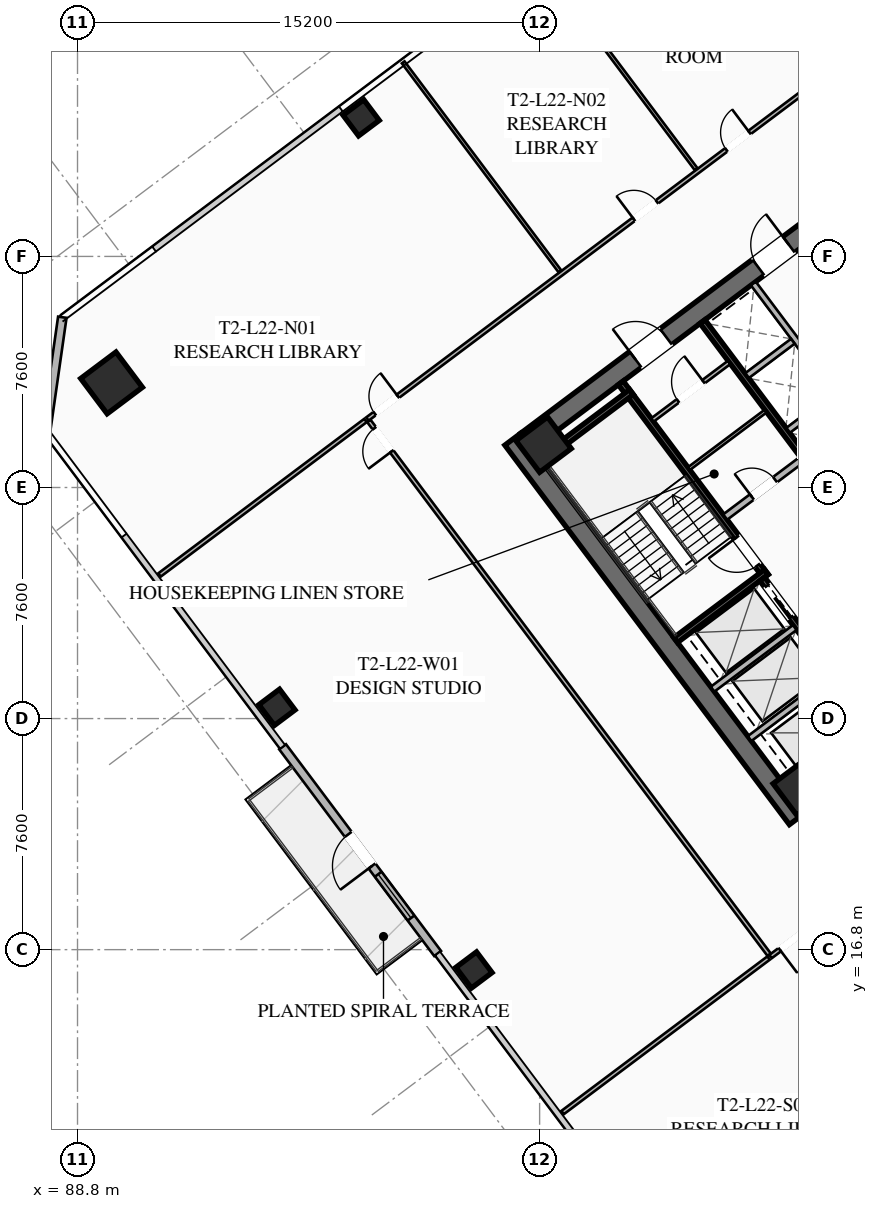
"""IFC4 building model, lengths in metres.
Left out: names, types, materials, properties, quantities, classifications, styles, units other than length and angle.
Written with IfcOpenShell. Run it as: python <this file> out.ifc"""

import sys

from ifc_helpers import new_model, si_unit, direction, frame, frame_2d, origin, origin_2d, place, context, subcontext, project, spatial, rectangle, hollow_rectangle, extrude, element, fill, save


model = new_model("IFC4")
c1 = context("Model", 3, precision=1e-05, world=origin(), true_north=direction((0.0, 1.0)))
c2 = subcontext(c1, "Body", "Model", "MODEL_VIEW")
j1 = project(units=[si_unit("LENGTHUNIT", "METRE"), si_unit("PLANEANGLEUNIT", "RADIAN")], contexts=[c1])
p1 = place(None, origin())
s1 = spatial("IfcSite", under=j1, at=p1, CompositionType="ELEMENT")
p2 = place(p1, origin())
s2 = spatial("IfcBuilding", under=s1, at=p2, CompositionType="ELEMENT")
p3 = place(p2, frame((0.0, 0.0, 84.95)))
s3 = spatial("IfcBuildingStorey", under=s2, at=p3, CompositionType="ELEMENT", Elevation=84.95)
p4 = place(p3, frame((112.476, 21.107, 0.0), z_axis=(0.0, 0.0, 1.0), x_axis=(-0.600005007985, 0.799996243986, 0.0)))
e1 = element("IfcWall", 1, at=p4, inside=s3, PredefinedType="SHEAR", context=c2, shape_type="SweptSolid", body=[
    extrude(rectangle(XDim=15.6, YDim=0.65, at=frame_2d((7.8, 0.0))), origin(), (0.0, 0.0, 1.0), 3.55),
])
p5 = place(p3, frame((124.429, 30.478, 0.0), z_axis=(0.0, 0.0, 1.0), x_axis=(-0.799998028465, -0.600002628705, 0.0)))
e2 = element("IfcWall", 2, at=p5, inside=s3, PredefinedType="SHEAR", context=c2, shape_type="SweptSolid", body=[
    extrude(rectangle(XDim=14.86, YDim=0.65, at=frame_2d((7.43, 0.0))), origin(), (0.0, 0.0, 1.0), 3.55),
])
p6 = place(p5, frame((9.13, 0.0, 0.0)))
e3 = element("IfcOpeningElement", 3, at=p6, cuts=e2, PredefinedType="OPENING", context=c2, shape_type="SweptSolid", body=[
    extrude(rectangle(XDim=1.25, YDim=2.25, at=frame_2d((0.625, 1.125))), frame((0.0, 0.335, 0.0), z_axis=(0.0, -1.0, 0.0), x_axis=(1.0, 0.0, 0.0)), (0.0, 0.0, 1.0), 0.67),
])
p7 = place(p5, frame((4.08, 0.0, 0.0)))
e4 = element("IfcOpeningElement", 4, at=p7, cuts=e2, PredefinedType="OPENING", context=c2, shape_type="SweptSolid", body=[
    extrude(rectangle(XDim=1.25, YDim=2.25, at=frame_2d((0.625, 1.125))), frame((0.0, 0.335, 0.0), z_axis=(0.0, -1.0, 0.0), x_axis=(1.0, 0.0, 0.0)), (0.0, 0.0, 1.0), 0.67),
])
p8 = place(p3, frame((103.571, 33.522, 0.0), z_axis=(0.0, 0.0, 1.0), x_axis=(0.799998028465, 0.600002628705, 0.0)))
e5 = element("IfcWall", 5, at=p8, inside=s3, PredefinedType="SHEAR", context=c2, shape_type="SweptSolid", body=[
    extrude(rectangle(XDim=14.86, YDim=0.65, at=frame_2d((7.43, 0.0))), origin(), (0.0, 0.0, 1.0), 3.55),
])
p9 = place(p8, frame((4.48, 0.0, 0.0)))
e6 = element("IfcOpeningElement", 6, at=p9, cuts=e5, PredefinedType="OPENING", context=c2, shape_type="SweptSolid", body=[
    extrude(rectangle(XDim=1.25, YDim=2.25, at=frame_2d((0.625, 1.125))), frame((0.0, 0.335, 0.0), z_axis=(0.0, -1.0, 0.0), x_axis=(1.0, 0.0, 0.0)), (0.0, 0.0, 1.0), 0.67),
])
p10 = place(p8, frame((9.53, 0.0, 0.0)))
e7 = element("IfcOpeningElement", 7, at=p10, cuts=e5, PredefinedType="OPENING", context=c2, shape_type="SweptSolid", body=[
    extrude(rectangle(XDim=1.25, YDim=2.25, at=frame_2d((0.625, 1.125))), frame((0.0, 0.335, 0.0), z_axis=(0.0, -1.0, 0.0), x_axis=(1.0, 0.0, 0.0)), (0.0, 0.0, 1.0), 0.67),
])
for number, where, z_axis, x_axis in (
    (8, (112.59, 22.13, 0.0), (0.0, 0.0, 1.0), (0.8, 0.6, 0.0)),
    (9, (104.13, 33.41, 0.0), (0.0, 0.0, 1.0), (0.8, 0.6, 0.0)),
):
    element("IfcColumn", number, at=place(p3, frame(where, z_axis=z_axis, x_axis=x_axis)), inside=s3, PredefinedType="COLUMN", context=c2, shape_type="SweptSolid", body=[
        extrude(hollow_rectangle(XDim=1.3, YDim=1.3, WallThickness=0.05, at=origin_2d()), origin(), (0.0, 0.0, 1.0), 3.35),
    ])
p11 = place(p3, frame((89.92, 35.44, 0.0), z_axis=(0.0, 0.0, 1.0), x_axis=(0.799999996291, 0.600000004945, 0.0)))
e10 = element("IfcColumn", 10, at=p11, inside=s3, PredefinedType="COLUMN", context=c2, shape_type="SweptSolid", body=[
    extrude(hollow_rectangle(XDim=1.45, YDim=1.45, WallThickness=0.055, at=origin_2d()), origin(), (0.0, 0.0, 1.0), 3.35),
])
for number, where, z_axis, x_axis in (
    (11, (98.13, 44.16, 0.0), (0.0, 0.0, 1.0), (0.8, 0.6, 0.0)),
    (12, (95.36, 24.77, 0.0), (0.0, 0.0, 1.0), (0.8, 0.6, 0.0)),
    (13, (101.84, 16.13, 0.0), (0.0, 0.0, 1.0), (0.8, 0.6, 0.0)),
):
    element("IfcColumn", number, at=place(p3, frame(where, z_axis=z_axis, x_axis=x_axis)), inside=s3, PredefinedType="COLUMN", context=c2, shape_type="SweptSolid", body=[
        extrude(hollow_rectangle(XDim=0.85, YDim=0.85, WallThickness=0.035, at=origin_2d()), origin(), (0.0, 0.0, 1.0), 3.35),
    ])
p12 = place(p3, frame((100.646, 16.672, 0.0), z_axis=(0.0, 0.0, 1.0), x_axis=(-0.600018382406, 0.799986212866, 0.0)))
e14 = element("IfcWall", 14, at=p12, inside=s3, PredefinedType="SOLIDWALL", context=c2, shape_type="SweptSolid", body=[
    extrude(rectangle(XDim=8.5, YDim=0.28, at=frame_2d((4.25, 0.0))), origin(), (0.0, 0.0, 1.0), 3.35),
])
p13 = place(p12, frame((3.6, 0.0, 0.0)))
e15 = element("IfcOpeningElement", 15, at=p13, cuts=e14, PredefinedType="OPENING", context=c2, shape_type="SweptSolid", body=[
    extrude(rectangle(XDim=1.3, YDim=2.15, at=frame_2d((0.65, 1.075))), frame((0.0, 0.15, 0.0), z_axis=(0.0, -1.0, 0.0), x_axis=(1.0, 0.0, 0.0)), (0.0, 0.0, 1.0), 0.3),
])
p14 = place(p12, frame((1.46, 0.0, 0.85)))
e16 = element("IfcOpeningElement", 16, at=p14, cuts=e14, PredefinedType="OPENING", context=c2, shape_type="SweptSolid", body=[
    extrude(rectangle(XDim=1.8, YDim=1.92, at=frame_2d((0.9, 0.96))), frame((0.0, 0.15, 0.0), z_axis=(0.0, -1.0, 0.0), x_axis=(1.0, 0.0, 0.0)), (0.0, 0.0, 1.0), 0.3),
])
p15 = place(p3, frame((87.76, 33.82, 0.0), z_axis=(0.0, 0.0, 1.0), x_axis=(0.141430307517, 0.989948214866, 0.0)))
e17 = element("IfcWall", 17, at=p15, inside=s3, PredefinedType="SOLIDWALL", context=c2, shape_type="SweptSolid", body=[
    extrude(rectangle(XDim=3.818, YDim=0.28, at=frame_2d((1.909, 0.0))), origin(), (0.0, 0.0, 1.0), 3.35),
])
p16 = place(p3, frame((111.44, 29.08, 0.0), z_axis=(0.0, 0.0, 1.0), x_axis=(-0.600009827119, 0.799992629566, 0.0)))
e18 = element("IfcWall", 18, at=p16, inside=s3, PredefinedType="SHEAR", context=c2, shape_type="SweptSolid", body=[
    extrude(rectangle(XDim=7.95, YDim=0.2, at=frame_2d((3.975, 0.0))), origin(), (0.0, 0.0, 1.0), 3.35),
])
p17 = place(p16, frame((0.45, 0.0, 0.0)))
e19 = element("IfcOpeningElement", 19, at=p17, cuts=e18, PredefinedType="OPENING", context=c2, shape_type="SweptSolid", body=[
    extrude(rectangle(XDim=1.15, YDim=2.2, at=frame_2d((0.575, 1.1))), frame((0.0, 0.11, 0.0), z_axis=(0.0, -1.0, 0.0), x_axis=(1.0, 0.0, 0.0)), (0.0, 0.0, 1.0), 0.22),
])
for number, where, z_axis, x_axis in (
    (20, (108.476, 26.982, 0.0), (0.0, 0.0, 1.0), (0.8, 0.6, 0.0)),
    (21, (104.036, 32.902, 0.0), (0.0, 0.0, 1.0), (0.8, 0.6, 0.0)),
):
    element("IfcWall", number, at=place(p3, frame(where, z_axis=z_axis, x_axis=x_axis)), inside=s3, PredefinedType="SHEAR", context=c2, shape_type="SweptSolid", body=[
        extrude(rectangle(XDim=3.73, YDim=0.2, at=frame_2d((1.865, 0.0))), origin(), (0.0, 0.0, 1.0), 3.35),
    ])
p18 = place(p3, frame((117.938, 26.016, 0.0), z_axis=(0.0, 0.0, 1.0), x_axis=(-0.600005463273, 0.799995902516, 0.0)))
e22 = element("IfcWall", 22, at=p18, inside=s3, PredefinedType="SHEAR", context=c2, shape_type="SweptSolid", body=[
    extrude(rectangle(XDim=14.3, YDim=0.2, at=frame_2d((7.15, 0.0))), origin(), (0.0, 0.0, 1.0), 3.35),
])
p19 = place(p3, frame((110.104, 31.028, 0.0), z_axis=(0.0, 0.0, 1.0), x_axis=(0.800018601094, 0.59997519774, 0.0)))
e23 = element("IfcWall", 23, at=p19, inside=s3, PredefinedType="SOLIDWALL", context=c2, shape_type="SweptSolid", body=[
    extrude(rectangle(XDim=3.15, YDim=0.22, at=frame_2d((1.575, 0.0))), origin(), (0.0, 0.0, 1.0), 2.703),
])
p20 = place(p19, frame((1.1, 0.0, 0.0)))
e24 = element("IfcOpeningElement", 24, at=p20, cuts=e23, PredefinedType="OPENING", context=c2, shape_type="SweptSolid", body=[
    extrude(rectangle(XDim=0.95, YDim=2.05, at=frame_2d((0.475, 1.025))), frame((0.0, 0.12, 0.0), z_axis=(0.0, -1.0, 0.0), x_axis=(1.0, 0.0, 0.0)), (0.0, 0.0, 1.0), 0.24),
])
p21 = place(p3, frame((115.13, 23.91, 0.0), z_axis=(0.0, 0.0, 1.0), x_axis=(-0.599975393228, 0.800018454488, 0.0)))
e25 = element("IfcWall", 25, at=p21, inside=s3, PredefinedType="SHEAR", context=c2, shape_type="SweptSolid", body=[
    extrude(rectangle(XDim=6.35, YDim=0.2, at=frame_2d((3.175, 0.0))), origin(), (0.0, 0.0, 1.0), 3.35),
])
p22 = place(p21, frame((4.775, 0.0, 0.0)))
e26 = element("IfcOpeningElement", 26, at=p22, cuts=e25, PredefinedType="OPENING", context=c2, shape_type="SweptSolid", body=[
    extrude(rectangle(XDim=1.3, YDim=2.25, at=frame_2d((0.65, 1.125))), frame((0.0, 0.11, 0.0), z_axis=(0.0, -1.0, 0.0), x_axis=(1.0, 0.0, 0.0)), (0.0, 0.0, 1.0), 0.22),
])
p23 = place(p21, frame((2.775, 0.0, 0.0)))
e27 = element("IfcOpeningElement", 27, at=p23, cuts=e25, PredefinedType="OPENING", context=c2, shape_type="SweptSolid", body=[
    extrude(rectangle(XDim=1.3, YDim=2.25, at=frame_2d((0.65, 1.125))), frame((0.0, 0.11, 0.0), z_axis=(0.0, -1.0, 0.0), x_axis=(1.0, 0.0, 0.0)), (0.0, 0.0, 1.0), 0.22),
])
p24 = place(p21, frame((0.575, 0.0, 0.0)))
e28 = element("IfcOpeningElement", 28, at=p24, cuts=e25, PredefinedType="OPENING", context=c2, shape_type="SweptSolid", body=[
    extrude(rectangle(XDim=1.3, YDim=2.25, at=frame_2d((0.65, 1.125))), frame((0.0, 0.11, 0.0), z_axis=(0.0, -1.0, 0.0), x_axis=(1.0, 0.0, 0.0)), (0.0, 0.0, 1.0), 0.22),
])
for number, where, z_axis, x_axis in (
    (29, (110.906, 23.742, 0.0), (0.0, 0.0, 1.0), (0.8, 0.6, 0.0)),
    (30, (109.688, 25.366, 0.0), (0.0, 0.0, 1.0), (0.8, 0.6, 0.0)),
):
    element("IfcWall", number, at=place(p3, frame(where, z_axis=z_axis, x_axis=x_axis)), inside=s3, PredefinedType="SOLIDWALL", context=c2, shape_type="SweptSolid", body=[
        extrude(rectangle(XDim=3.38, YDim=0.2, at=frame_2d((1.69, 0.0))), origin(), (0.0, 0.0, 1.0), 3.35),
    ])
p25 = place(p3, frame((107.71, 34.22, 0.0), z_axis=(0.0, 0.0, 1.0), x_axis=(0.799981399002, 0.60002480053, 0.0)))
e31 = element("IfcWall", 31, at=p25, inside=s3, PredefinedType="PARTITIONING", context=c2, shape_type="SweptSolid", body=[
    extrude(rectangle(XDim=3.15, YDim=0.135, at=frame_2d((1.575, 0.0))), origin(), (0.0, 0.0, 1.0), 2.703),
])
p26 = place(p25, frame((1.05, 0.0, 0.0)))
e32 = element("IfcOpeningElement", 32, at=p26, cuts=e31, PredefinedType="OPENING", context=c2, shape_type="SweptSolid", body=[
    extrude(rectangle(XDim=1.05, YDim=2.2, at=frame_2d((0.525, 1.1))), frame((0.0, 0.077, 0.0), z_axis=(0.0, -1.0, 0.0), x_axis=(1.0, 0.0, 0.0)), (0.0, 0.0, 1.0), 0.155),
])
p27 = place(p3, frame((108.91, 32.62, 0.0), z_axis=(0.0, 0.0, 1.0), x_axis=(0.800018601094, 0.59997519774, 0.0)))
e33 = element("IfcWall", 33, at=p27, inside=s3, PredefinedType="PARTITIONING", context=c2, shape_type="SweptSolid", body=[
    extrude(rectangle(XDim=3.15, YDim=0.11, at=frame_2d((1.575, 0.0))), origin(), (0.0, 0.0, 1.0), 2.703),
])
p28 = place(p3, frame((115.11, 33.27, 0.0), z_axis=(0.0, 0.0, 1.0), x_axis=(-0.600011488909, 0.79999138319, 0.0)))
e34 = element("IfcWall", 34, at=p28, inside=s3, PredefinedType="SOLIDWALL", context=c2, shape_type="SweptSolid", body=[
    extrude(rectangle(XDim=6.8, YDim=0.2, at=frame_2d((3.4, 0.0))), origin(), (0.0, 0.0, 1.0), 3.35),
])
p29 = place(p3, frame((112.176, 33.882, 0.0), z_axis=(0.0, 0.0, 1.0), x_axis=(0.8, 0.6, 0.0)))
e35 = element("IfcWall", 35, at=p29, inside=s3, PredefinedType="SOLIDWALL", context=c2, shape_type="SweptSolid", body=[
    extrude(rectangle(XDim=1.88, YDim=0.2, at=frame_2d((0.94, 0.0))), origin(), (0.0, 0.0, 1.0), 3.35),
])
p30 = place(p3, frame((110.826, 35.682, 0.0), z_axis=(0.0, 0.0, 1.0), x_axis=(0.799984418148, 0.600020775241, 0.0)))
e36 = element("IfcWall", 36, at=p30, inside=s3, PredefinedType="SOLIDWALL", context=c2, shape_type="SweptSolid", body=[
    extrude(rectangle(XDim=1.88, YDim=0.2, at=frame_2d((0.94, 0.0))), origin(), (0.0, 0.0, 1.0), 3.35),
])
p31 = place(p3, frame((98.336, 34.252, 0.0), z_axis=(0.0, 0.0, 1.0), x_axis=(0.8, 0.6, 0.0)))
e37 = element("IfcWall", 37, at=p31, inside=s3, PredefinedType="PARTITIONING", context=c2, shape_type="SweptSolid", body=[
    extrude(rectangle(XDim=28.23, YDim=0.135, at=frame_2d((14.115, 0.0))), origin(), (0.0, 0.0, 1.0), 2.703),
])
p32 = place(p31, frame((0.3, 0.0, 0.0)))
e38 = element("IfcOpeningElement", 38, at=p32, cuts=e37, PredefinedType="OPENING", context=c2, shape_type="SweptSolid", body=[
    extrude(rectangle(XDim=0.95, YDim=2.05, at=frame_2d((0.475, 1.025))), frame((0.0, 0.077, 0.0), z_axis=(0.0, -1.0, 0.0), x_axis=(1.0, 0.0, 0.0)), (0.0, 0.0, 1.0), 0.155),
])
p33 = place(p31, frame((10.953, 0.0, 0.0)))
e39 = element("IfcOpeningElement", 39, at=p33, cuts=e37, PredefinedType="OPENING", context=c2, shape_type="SweptSolid", body=[
    extrude(rectangle(XDim=0.95, YDim=2.05, at=frame_2d((0.475, 1.025))), frame((0.0, 0.077, 0.0), z_axis=(0.0, -1.0, 0.0), x_axis=(1.0, 0.0, 0.0)), (0.0, 0.0, 1.0), 0.155),
])
p34 = place(p31, frame((14.758, 0.0, 0.0)))
e40 = element("IfcOpeningElement", 40, at=p34, cuts=e37, PredefinedType="OPENING", context=c2, shape_type="SweptSolid", body=[
    extrude(rectangle(XDim=0.95, YDim=2.05, at=frame_2d((0.475, 1.025))), frame((0.0, 0.077, 0.0), z_axis=(0.0, -1.0, 0.0), x_axis=(1.0, 0.0, 0.0)), (0.0, 0.0, 1.0), 0.155),
])
p35 = place(p31, frame((26.98, 0.0, 0.0)))
e41 = element("IfcOpeningElement", 41, at=p35, cuts=e37, PredefinedType="OPENING", context=c2, shape_type="SweptSolid", body=[
    extrude(rectangle(XDim=0.95, YDim=2.05, at=frame_2d((0.475, 1.025))), frame((0.0, 0.077, 0.0), z_axis=(0.0, -1.0, 0.0), x_axis=(1.0, 0.0, 0.0)), (0.0, 0.0, 1.0), 0.155),
])
for number, where, z_axis, x_axis in (
    (42, (104.672, 39.104, 0.0), (0.0, 0.0, 1.0), (-0.6, 0.8, 0.0)),
    (43, (109.152, 42.464, 0.0), (0.0, 0.0, 1.0), (-0.6, 0.8, 0.0)),
):
    element("IfcWall", number, at=place(p3, frame(where, z_axis=z_axis, x_axis=x_axis)), inside=s3, PredefinedType="PARTITIONING", context=c2, shape_type="SweptSolid", body=[
        extrude(rectangle(XDim=8.6, YDim=0.11, at=frame_2d((4.3, 0.0))), origin(), (0.0, 0.0, 1.0), 2.703),
    ])
p36 = place(p3, frame((113.712, 45.884, 0.0), z_axis=(0.0, 0.0, 1.0), x_axis=(-0.6, 0.8, 0.0)))
e44 = element("IfcWall", 44, at=p36, inside=s3, PredefinedType="PARTITIONING", context=c2, shape_type="SweptSolid", body=[
    extrude(rectangle(XDim=8.6, YDim=0.11, at=frame_2d((4.3, 0.0))), origin(), (0.0, 0.0, 1.0), 2.703),
])
p37 = place(p3, frame((134.18, 33.51, 0.0), z_axis=(0.0, 0.0, 1.0), x_axis=(-0.8, -0.6, 0.0)))
e45 = element("IfcWall", 45, at=p37, inside=s3, PredefinedType="PARTITIONING", context=c2, shape_type="SweptSolid", body=[
    extrude(rectangle(XDim=28.23, YDim=0.135, at=frame_2d((14.115, 0.0))), origin(), (0.0, 0.0, 1.0), 2.703),
])
p38 = place(p37, frame((26.9, 0.0, 0.0)))
e46 = element("IfcOpeningElement", 46, at=p38, cuts=e45, PredefinedType="OPENING", context=c2, shape_type="SweptSolid", body=[
    extrude(rectangle(XDim=0.95, YDim=2.05, at=frame_2d((0.475, 1.025))), frame((0.0, 0.077, 0.0), z_axis=(0.0, -1.0, 0.0), x_axis=(1.0, 0.0, 0.0)), (0.0, 0.0, 1.0), 0.155),
])
p39 = place(p37, frame((16.368, 0.0, 0.0)))
e47 = element("IfcOpeningElement", 47, at=p39, cuts=e45, PredefinedType="OPENING", context=c2, shape_type="SweptSolid", body=[
    extrude(rectangle(XDim=0.95, YDim=2.05, at=frame_2d((0.475, 1.025))), frame((0.0, 0.077, 0.0), z_axis=(0.0, -1.0, 0.0), x_axis=(1.0, 0.0, 0.0)), (0.0, 0.0, 1.0), 0.155),
])
p40 = place(p37, frame((0.38, 0.0, 0.0)))
e48 = element("IfcOpeningElement", 48, at=p40, cuts=e45, PredefinedType="OPENING", context=c2, shape_type="SweptSolid", body=[
    extrude(rectangle(XDim=0.95, YDim=2.05, at=frame_2d((0.475, 1.025))), frame((0.0, 0.077, 0.0), z_axis=(0.0, -1.0, 0.0), x_axis=(1.0, 0.0, 0.0)), (0.0, 0.0, 1.0), 0.155),
])
p41 = place(p3, frame((111.548, 16.636, 0.0), z_axis=(0.0, 0.0, 1.0), x_axis=(-0.600001780419, 0.799998664682, 0.0)))
e49 = element("IfcWall", 49, at=p41, inside=s3, PredefinedType="PARTITIONING", context=c2, shape_type="SweptSolid", body=[
    extrude(rectangle(XDim=21.94, YDim=0.135, at=frame_2d((10.97, 0.0))), origin(), (0.0, 0.0, 1.0), 2.703),
])
p42 = place(p41, frame((20.69, 0.0, 0.0)))
e50 = element("IfcOpeningElement", 50, at=p42, cuts=e49, PredefinedType="OPENING", context=c2, shape_type="SweptSolid", body=[
    extrude(rectangle(XDim=0.95, YDim=2.05, at=frame_2d((0.475, 1.025))), frame((0.0, 0.077, 0.0), z_axis=(0.0, -1.0, 0.0), x_axis=(1.0, 0.0, 0.0)), (0.0, 0.0, 1.0), 0.155),
])
for number, where, z_axis, x_axis in (
    (51, (98.272, 34.204, 0.0), (0.0, 0.0, 1.0), (-0.8, -0.6, 0.0)),
    (52, (104.756, 11.442, 0.0), (0.0, 0.0, 1.0), (0.8, 0.6, 0.0)),
):
    element("IfcWall", number, at=place(p3, frame(where, z_axis=z_axis, x_axis=x_axis)), inside=s3, PredefinedType="PARTITIONING", context=c2, shape_type="SweptSolid", body=[
        extrude(rectangle(XDim=8.47, YDim=0.135, at=frame_2d((4.235, 0.0))), origin(), (0.0, 0.0, 1.0), 2.703),
    ])
p43 = place(p13, origin())
e53 = element("IfcDoor", 53, at=p43, inside=s3, OperationType="SINGLE_SWING_LEFT", PredefinedType="DOOR", context=c2, shape_type="SweptSolid", body=[
    extrude(rectangle(XDim=1.3, YDim=2.15, at=frame_2d((0.65, 1.075))), frame((0.0, 0.025, 0.0), z_axis=(0.0, -1.0, 0.0), x_axis=(1.0, 0.0, 0.0)), (0.0, 0.0, 1.0), 0.05),
])
fill(e15, e53)
p44 = place(p14, origin())
e54 = element("IfcWindow", 54, at=p44, inside=s3, PartitioningType="SINGLE_PANEL", PredefinedType="WINDOW", context=c2, shape_type="SweptSolid", body=[
    extrude(rectangle(XDim=1.8, YDim=1.92, at=frame_2d((0.9, 0.96))), frame((0.0, 0.03, 0.0), z_axis=(0.0, -1.0, 0.0), x_axis=(1.0, 0.0, 0.0)), (0.0, 0.0, 1.0), 0.06),
])
fill(e16, e54)
p45 = place(p9, origin())
e55 = element("IfcDoor", 55, at=p45, inside=s3, OperationType="SINGLE_SWING_LEFT", PredefinedType="DOOR", context=c2, shape_type="SweptSolid", body=[
    extrude(rectangle(XDim=1.25, YDim=2.25, at=frame_2d((0.625, 1.125))), frame((0.0, 0.025, 0.0), z_axis=(0.0, -1.0, 0.0), x_axis=(1.0, 0.0, 0.0)), (0.0, 0.0, 1.0), 0.05),
])
fill(e6, e55)
p46 = place(p10, origin())
e56 = element("IfcDoor", 56, at=p46, inside=s3, OperationType="SINGLE_SWING_RIGHT", PredefinedType="DOOR", context=c2, shape_type="SweptSolid", body=[
    extrude(rectangle(XDim=1.25, YDim=2.25, at=frame_2d((0.625, 1.125))), frame((0.0, 0.025, 0.0), z_axis=(0.0, -1.0, 0.0), x_axis=(1.0, 0.0, 0.0)), (0.0, 0.0, 1.0), 0.05),
])
fill(e7, e56)
p47 = place(p17, origin())
e57 = element("IfcDoor", 57, at=p47, inside=s3, OperationType="SINGLE_SWING_RIGHT", PredefinedType="DOOR", context=c2, shape_type="SweptSolid", body=[
    extrude(rectangle(XDim=1.15, YDim=2.2, at=frame_2d((0.575, 1.1))), frame((0.0, 0.025, 0.0), z_axis=(0.0, -1.0, 0.0), x_axis=(1.0, 0.0, 0.0)), (0.0, 0.0, 1.0), 0.05),
])
fill(e19, e57)
p48 = place(p26, origin())
e58 = element("IfcDoor", 58, at=p48, inside=s3, OperationType="SINGLE_SWING_RIGHT", PredefinedType="DOOR", context=c2, shape_type="SweptSolid", body=[
    extrude(rectangle(XDim=1.05, YDim=2.2, at=frame_2d((0.525, 1.1))), frame((0.0, 0.025, 0.0), z_axis=(0.0, -1.0, 0.0), x_axis=(1.0, 0.0, 0.0)), (0.0, 0.0, 1.0), 0.05),
])
fill(e32, e58)
p49 = place(p20, origin())
e59 = element("IfcDoor", 59, at=p49, inside=s3, OperationType="SINGLE_SWING_LEFT", PredefinedType="DOOR", context=c2, shape_type="SweptSolid", body=[
    extrude(rectangle(XDim=0.95, YDim=2.05, at=frame_2d((0.475, 1.025))), frame((0.0, 0.025, 0.0), z_axis=(0.0, -1.0, 0.0), x_axis=(1.0, 0.0, 0.0)), (0.0, 0.0, 1.0), 0.05),
])
fill(e24, e59)
p50 = place(p32, origin())
e60 = element("IfcDoor", 60, at=p50, inside=s3, OperationType="SINGLE_SWING_RIGHT", PredefinedType="DOOR", context=c2, shape_type="SweptSolid", body=[
    extrude(rectangle(XDim=0.95, YDim=2.05, at=frame_2d((0.475, 1.025))), frame((0.0, 0.025, 0.0), z_axis=(0.0, -1.0, 0.0), x_axis=(1.0, 0.0, 0.0)), (0.0, 0.0, 1.0), 0.05),
])
fill(e38, e60)
p51 = place(p33, origin())
e61 = element("IfcDoor", 61, at=p51, inside=s3, OperationType="SINGLE_SWING_LEFT", PredefinedType="DOOR", context=c2, shape_type="SweptSolid", body=[
    extrude(rectangle(XDim=0.95, YDim=2.05, at=frame_2d((0.475, 1.025))), frame((0.0, 0.025, 0.0), z_axis=(0.0, -1.0, 0.0), x_axis=(1.0, 0.0, 0.0)), (0.0, 0.0, 1.0), 0.05),
])
fill(e39, e61)
p52 = place(p34, origin())
e62 = element("IfcDoor", 62, at=p52, inside=s3, OperationType="SINGLE_SWING_RIGHT", PredefinedType="DOOR", context=c2, shape_type="SweptSolid", body=[
    extrude(rectangle(XDim=0.95, YDim=2.05, at=frame_2d((0.475, 1.025))), frame((0.0, 0.025, 0.0), z_axis=(0.0, -1.0, 0.0), x_axis=(1.0, 0.0, 0.0)), (0.0, 0.0, 1.0), 0.05),
])
fill(e40, e62)
p53 = place(p38, origin())
e63 = element("IfcDoor", 63, at=p53, inside=s3, OperationType="SINGLE_SWING_RIGHT", PredefinedType="DOOR", context=c2, shape_type="SweptSolid", body=[
    extrude(rectangle(XDim=0.95, YDim=2.05, at=frame_2d((0.475, 1.025))), frame((0.0, 0.025, 0.0), z_axis=(0.0, -1.0, 0.0), x_axis=(1.0, 0.0, 0.0)), (0.0, 0.0, 1.0), 0.05),
])
fill(e46, e63)
p54 = place(p42, origin())
e64 = element("IfcDoor", 64, at=p54, inside=s3, OperationType="SINGLE_SWING_LEFT", PredefinedType="DOOR", context=c2, shape_type="SweptSolid", body=[
    extrude(rectangle(XDim=0.95, YDim=2.05, at=frame_2d((0.475, 1.025))), frame((0.0, 0.025, 0.0), z_axis=(0.0, -1.0, 0.0), x_axis=(1.0, 0.0, 0.0)), (0.0, 0.0, 1.0), 0.05),
])
fill(e50, e64)
p55 = place(p22, origin())
e65 = element("IfcDoor", 65, at=p55, inside=s3, OperationType="SLIDING_TO_LEFT", PredefinedType="DOOR", context=c2, shape_type="SweptSolid", body=[
    extrude(rectangle(XDim=1.3, YDim=2.25, at=frame_2d((0.65, 1.125))), frame((0.0, 0.025, 0.0), z_axis=(0.0, -1.0, 0.0), x_axis=(1.0, 0.0, 0.0)), (0.0, 0.0, 1.0), 0.05),
])
fill(e26, e65)
save(model, sys.argv[1])
